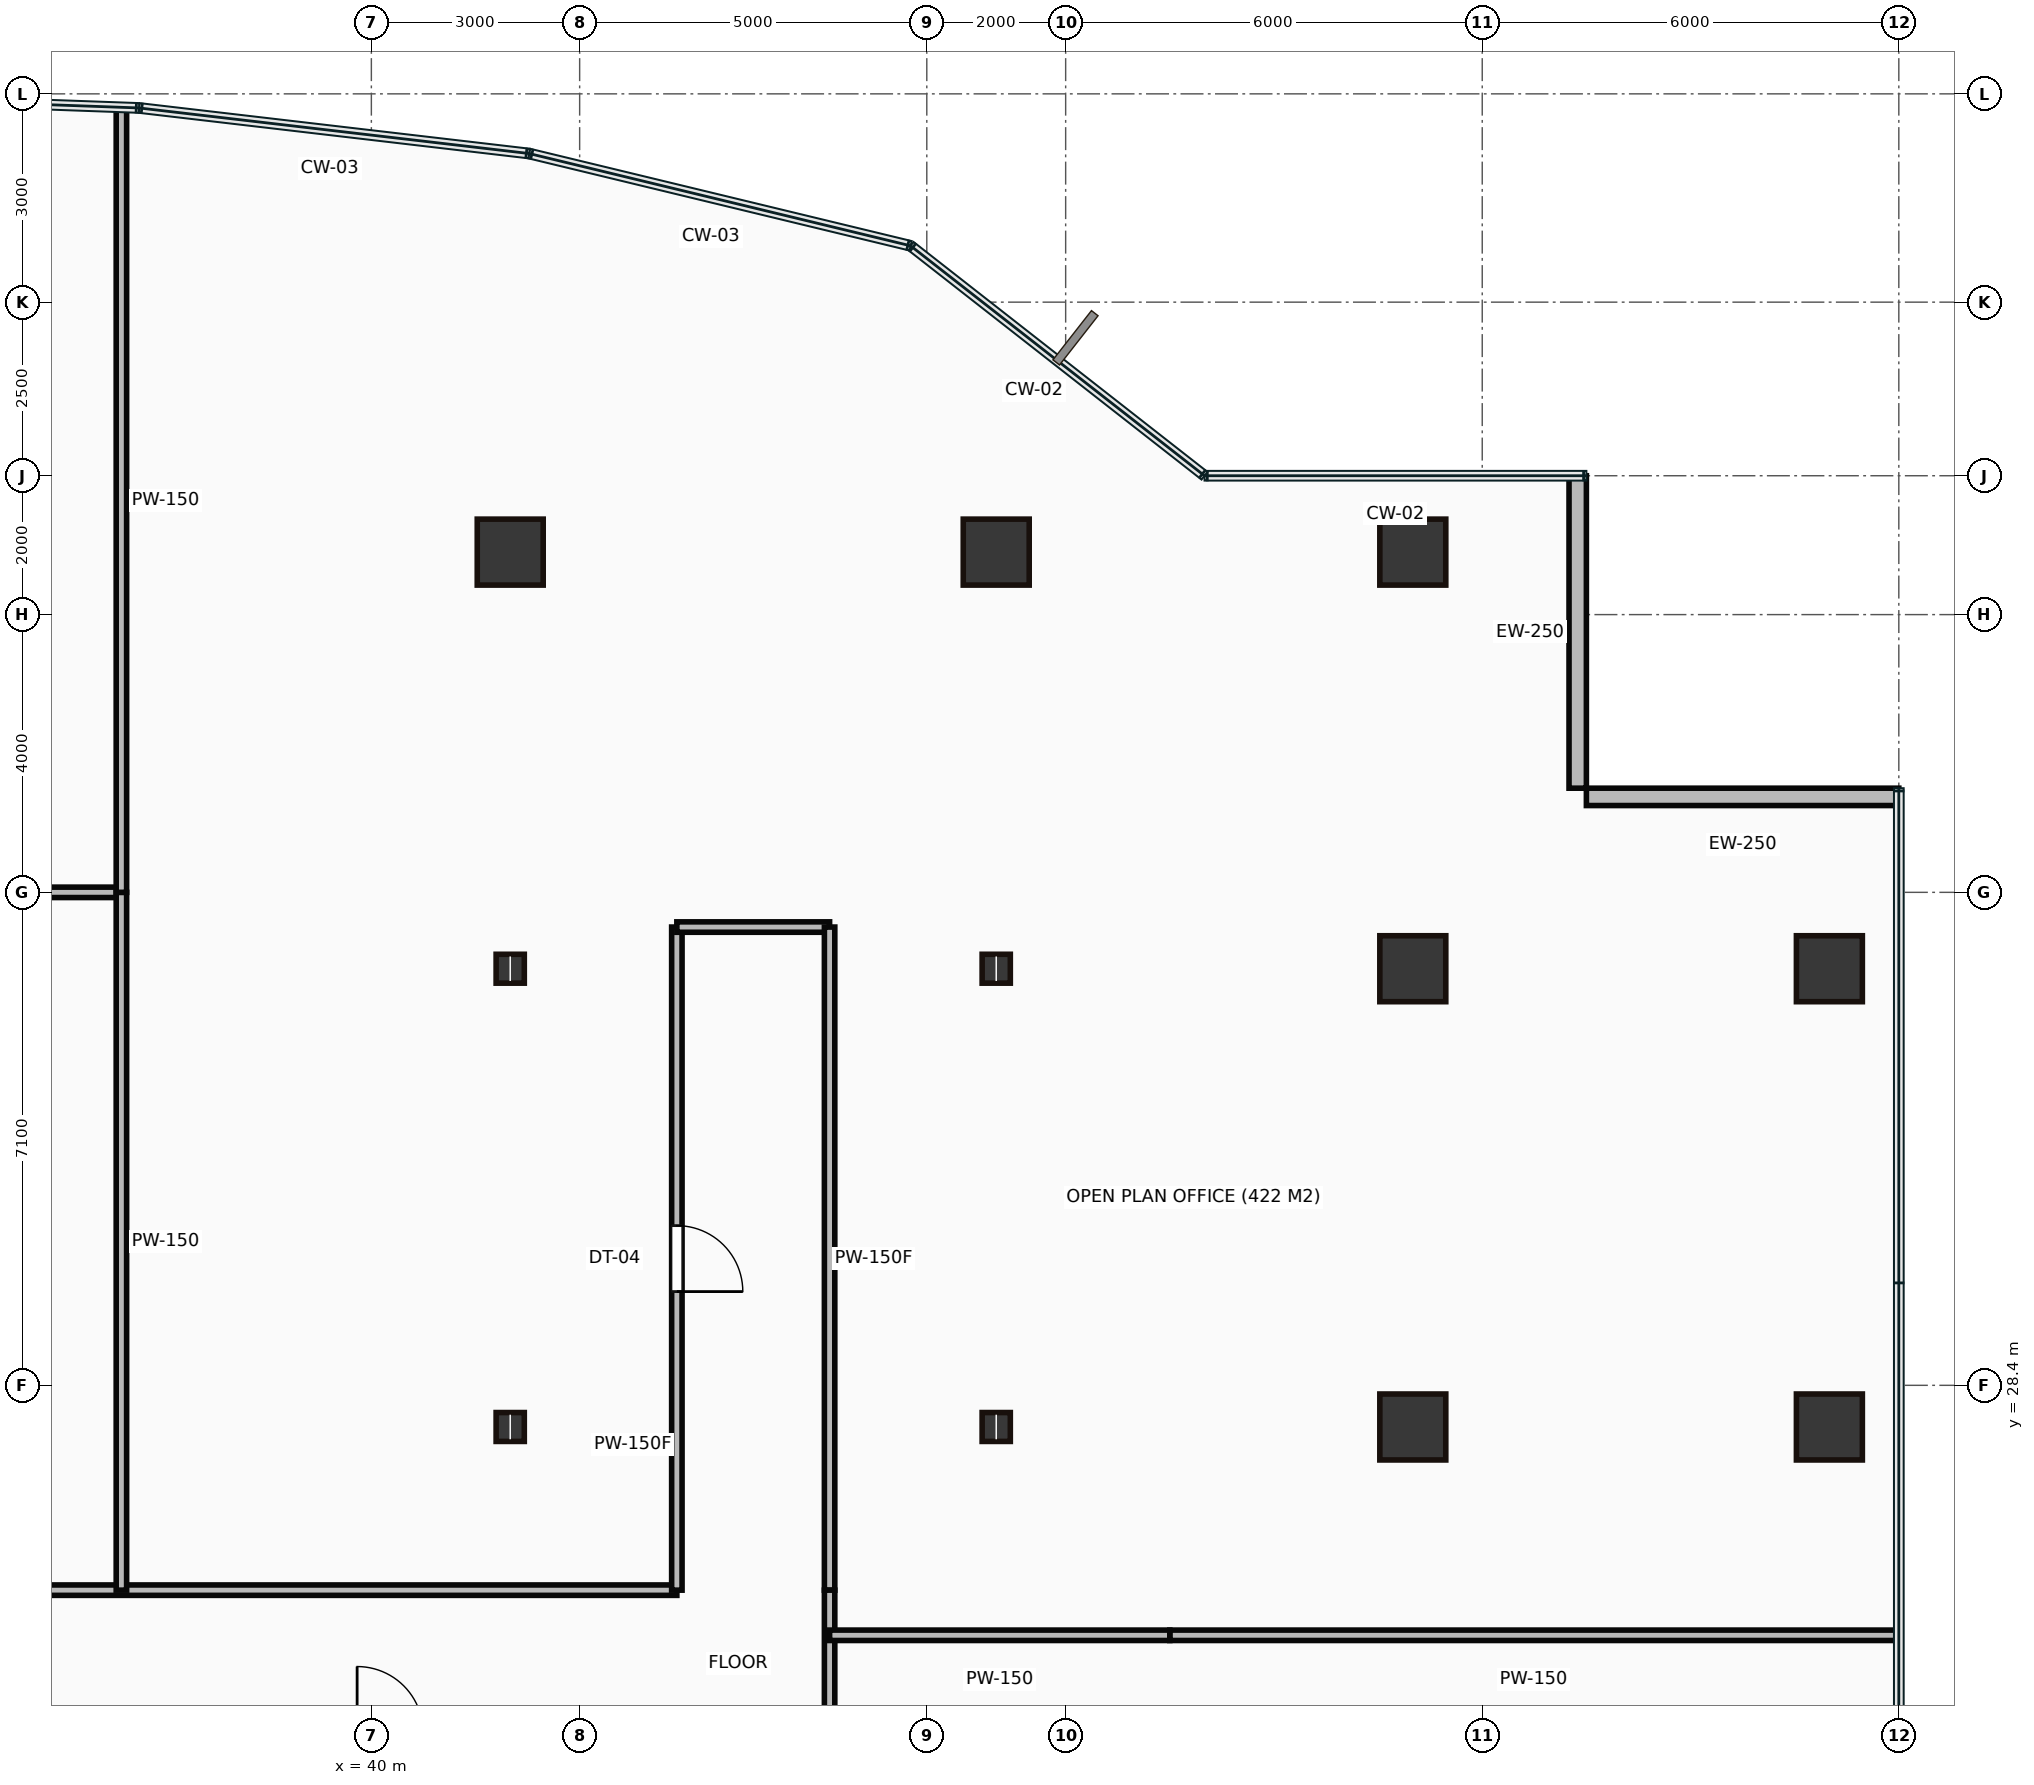
"""IFC4 building model, lengths in metres.
Left out: names, types, materials, properties, quantities, classifications, styles, units other than length and angle.
Written with IfcOpenShell. Run it as: python <this file> out.ifc"""

import sys

from ifc_helpers import new_model, si_unit, direction, frame, frame_2d, origin, origin_2d, place, context, subcontext, project, spatial, rectangle, hollow_rectangle, i_section, extrude, source, transform, mapped, element, fill, save


model = new_model("IFC4")
c1 = context("Model", 3, precision=1e-05, world=origin(), true_north=direction((0.0, 1.0)))
c2 = subcontext(c1, "Body", "Model", "MODEL_VIEW")
j1 = project(units=[si_unit("LENGTHUNIT", "METRE"), si_unit("PLANEANGLEUNIT", "RADIAN")], contexts=[c1])
p1 = place(None, origin())
s1 = spatial("IfcSite", under=j1, at=p1, CompositionType="ELEMENT")
p2 = place(p1, origin())
s2 = spatial("IfcBuilding", under=s1, at=p2, CompositionType="ELEMENT")
p3 = place(p2, frame((0.0, 0.0, 50.75)))
s3 = spatial("IfcBuildingStorey", under=s2, at=p3, CompositionType="ELEMENT", Elevation=50.75)
m1 = source(origin(), c2, "Body", "SweptSolid", [
    extrude(i_section(OverallWidth=0.406, OverallDepth=0.416, WebThickness=0.03, FlangeThickness=0.048, at=origin_2d()), origin(), (0.0, 0.0, 1.0), 3.65),
])
for number, where, z_axis, x_axis in (
    (1, (42.0, 27.8, 0.0), (0.0, 0.0, 1.0), (1.0, 0.0, 0.0)),
    (2, (42.0, 34.4, 0.0), (0.0, 0.0, 1.0), (1.0, 0.0, 0.0)),
):
    element("IfcColumn", number, at=place(p3, frame(where, z_axis=z_axis, x_axis=x_axis)), inside=s3, PredefinedType="COLUMN", context=c2, shape_type="MappedRepresentation", body=[
        mapped(m1, transform((0.0, 0.0, 0.0))),
    ])
m2 = source(origin(), c2, "Body", "SweptSolid", [
    extrude(hollow_rectangle(XDim=0.95, YDim=0.95, WallThickness=0.045, at=origin_2d()), origin(), (0.0, 0.0, 1.0), 3.65),
])
p4 = place(p3, frame((42.0, 40.4, 0.0), z_axis=(0.0, 0.0, 1.0), x_axis=(1.0, 0.0, 0.0)))
e3 = element("IfcColumn", 3, at=p4, inside=s3, PredefinedType="COLUMN", context=c2, shape_type="MappedRepresentation", body=[
    mapped(m2, transform((0.0, 0.0, 0.0))),
])
for number, where, z_axis, x_axis in (
    (4, (49.0, 27.8, 0.0), (0.0, 0.0, 1.0), (1.0, 0.0, 0.0)),
    (5, (49.0, 34.4, 0.0), (0.0, 0.0, 1.0), (1.0, 0.0, 0.0)),
):
    element("IfcColumn", number, at=place(p3, frame(where, z_axis=z_axis, x_axis=x_axis)), inside=s3, PredefinedType="COLUMN", context=c2, shape_type="MappedRepresentation", body=[
        mapped(m1, transform((0.0, 0.0, 0.0))),
    ])
for number, where, z_axis, x_axis in (
    (6, (49.0, 40.4, 0.0), (0.0, 0.0, 1.0), (1.0, 0.0, 0.0)),
    (7, (55.0, 27.8, 0.0), (0.0, 0.0, 1.0), (1.0, 0.0, 0.0)),
    (8, (55.0, 34.4, 0.0), (0.0, 0.0, 1.0), (1.0, 0.0, 0.0)),
    (9, (55.0, 40.4, 0.0), (0.0, 0.0, 1.0), (1.0, 0.0, 0.0)),
    (10, (61.0, 27.8, 0.0), (0.0, 0.0, 1.0), (1.0, 0.0, 0.0)),
    (11, (61.0, 34.4, 0.0), (0.0, 0.0, 1.0), (1.0, 0.0, 0.0)),
):
    element("IfcColumn", number, at=place(p3, frame(where, z_axis=z_axis, x_axis=x_axis)), inside=s3, PredefinedType="COLUMN", context=c2, shape_type="MappedRepresentation", body=[
        mapped(m2, transform((0.0, 0.0, 0.0))),
    ])
m3 = source(origin(), c2, "Body", "SweptSolid", [
    extrude(rectangle(XDim=4.5, YDim=0.25, at=frame_2d((2.25, 0.0))), origin(), (0.0, 0.0, 1.0), 3.4),
])
for number, where, z_axis, x_axis in (
    (12, (62.0, 36.875, 0.0), (0.0, 0.0, 1.0), (-1.0, 0.0, 0.0)),
    (13, (57.375, 37.0, 0.0), (0.0, 0.0, 1.0), (0.0, 1.0, 0.0)),
):
    element("IfcWall", number, at=place(p3, frame(where, z_axis=z_axis, x_axis=x_axis)), inside=s3, PredefinedType="STANDARD", context=c2, shape_type="MappedRepresentation", body=[
        mapped(m3, transform((0.0, 0.0, 0.0))),
    ])
m4 = source(origin(), c2, "Body", "SweptSolid", [
    extrude(rectangle(XDim=38.8, YDim=0.15, at=frame_2d((19.4, 0.0))), origin(), (0.0, 0.0, 1.0), 3.4),
])
p5 = place(p3, frame((5.6, 25.45, 0.0), z_axis=(0.0, 0.0, 1.0), x_axis=(1.0, 0.0, 0.0)))
e14 = element("IfcWall", 14, at=p5, inside=s3, PredefinedType="PARTITIONING", context=c2, shape_type="MappedRepresentation", body=[
    mapped(m4, transform((0.0, 0.0, 0.0))),
])
p6 = place(p5, frame((14.125, 0.0, 0.0)))
e15 = element("IfcOpeningElement", 15, at=p6, cuts=e14, PredefinedType="OPENING", context=c2, shape_type="SweptSolid", body=[
    extrude(rectangle(XDim=0.95, YDim=2.15, at=frame_2d((0.475, 1.075))), frame((0.0, 0.085, 0.0), z_axis=(0.0, -1.0, 0.0), x_axis=(1.0, 0.0, 0.0)), (0.0, 0.0, 1.0), 0.17),
])
p7 = place(p5, frame((24.925, 0.0, 0.0)))
e16 = element("IfcOpeningElement", 16, at=p7, cuts=e14, PredefinedType="OPENING", context=c2, shape_type="SweptSolid", body=[
    extrude(rectangle(XDim=0.95, YDim=2.15, at=frame_2d((0.475, 1.075))), frame((0.0, 0.085, 0.0), z_axis=(0.0, -1.0, 0.0), x_axis=(1.0, 0.0, 0.0)), (0.0, 0.0, 1.0), 0.17),
])
m5 = source(origin(), c2, "Body", "SweptSolid", [
    extrude(rectangle(XDim=9.55, YDim=0.15, at=frame_2d((4.775, 0.0))), origin(), (0.0, 0.0, 1.0), 3.4),
])
p8 = place(p3, frame((44.4, 25.45, 0.0), z_axis=(0.0, 0.0, 1.0), x_axis=(0.0, 1.0, 0.0)))
e17 = element("IfcWall", 17, at=p8, inside=s3, PredefinedType="PARTITIONING", context=c2, shape_type="MappedRepresentation", body=[
    mapped(m5, transform((0.0, 0.0, 0.0))),
])
p9 = place(p8, frame((4.3, 0.0, 0.0)))
e18 = element("IfcOpeningElement", 18, at=p9, cuts=e17, PredefinedType="OPENING", context=c2, shape_type="SweptSolid", body=[
    extrude(rectangle(XDim=0.95, YDim=2.15, at=frame_2d((0.475, 1.075))), frame((0.0, 0.085, 0.0), z_axis=(0.0, -1.0, 0.0), x_axis=(1.0, 0.0, 0.0)), (0.0, 0.0, 1.0), 0.17),
])
m6 = source(origin(), c2, "Body", "SweptSolid", [
    extrude(rectangle(XDim=2.2, YDim=0.15, at=frame_2d((1.1, 0.0))), origin(), (0.0, 0.0, 1.0), 3.4),
])
p10 = place(p3, frame((44.4, 35.0, 0.0), z_axis=(0.0, 0.0, 1.0), x_axis=(1.0, 0.0, 0.0)))
e19 = element("IfcWall", 19, at=p10, inside=s3, PredefinedType="PARTITIONING", context=c2, shape_type="MappedRepresentation", body=[
    mapped(m6, transform((0.0, 0.0, 0.0))),
])
p11 = place(p3, frame((46.6, 35.0, 0.0), z_axis=(0.0, 0.0, 1.0), x_axis=(0.0, -1.0, 0.0)))
e20 = element("IfcWall", 20, at=p11, inside=s3, PredefinedType="PARTITIONING", context=c2, shape_type="MappedRepresentation", body=[
    mapped(m5, transform((0.0, 0.0, 0.0))),
])
m7 = source(origin(), c2, "Body", "SweptSolid", [
    extrude(rectangle(XDim=2.05, YDim=0.15, at=frame_2d((1.025, 0.0))), origin(), (0.0, 0.0, 1.0), 3.4),
])
p12 = place(p3, frame((46.6, 25.45, 0.0), z_axis=(0.0, 0.0, 1.0), x_axis=(0.0, -1.0, 0.0)))
e21 = element("IfcWall", 21, at=p12, inside=s3, PredefinedType="PARTITIONING", context=c2, shape_type="MappedRepresentation", body=[
    mapped(m7, transform((0.0, 0.0, 0.0))),
])
m8 = source(origin(), c2, "Body", "SweptSolid", [
    extrude(rectangle(XDim=10.8, YDim=0.15, at=frame_2d((5.4, 0.0))), origin(), (0.0, 0.0, 1.0), 3.4),
])
p13 = place(p3, frame((36.4, 35.5, 0.0), z_axis=(0.0, 0.0, 1.0), x_axis=(-1.0, 0.0, 0.0)))
e22 = element("IfcWall", 22, at=p13, inside=s3, PredefinedType="PARTITIONING", context=c2, shape_type="MappedRepresentation", body=[
    mapped(m8, transform((0.0, 0.0, 0.0))),
])
m9 = source(origin(), c2, "Body", "SweptSolid", [
    extrude(rectangle(XDim=10.05, YDim=0.15, at=frame_2d((5.025, 0.0))), origin(), (0.0, 0.0, 1.0), 3.4),
])
p14 = place(p3, frame((36.4, 35.5, 0.0), z_axis=(0.0, 0.0, 1.0), x_axis=(0.0, -1.0, 0.0)))
e23 = element("IfcWall", 23, at=p14, inside=s3, PredefinedType="PARTITIONING", context=c2, shape_type="MappedRepresentation", body=[
    mapped(m9, transform((0.0, 0.0, 0.0))),
])
m10 = source(origin(), c2, "Body", "SweptSolid", [
    extrude(rectangle(XDim=11.286, YDim=0.15, at=frame_2d((5.643, 0.0))), origin(), (0.0, 0.0, 1.0), 3.4),
])
p15 = place(p3, frame((36.4, 46.786, 0.0), z_axis=(0.0, 0.0, 1.0), x_axis=(0.0, -1.0, 0.0)))
e24 = element("IfcWall", 24, at=p15, inside=s3, PredefinedType="PARTITIONING", context=c2, shape_type="MappedRepresentation", body=[
    mapped(m10, transform((0.0, 0.0, 0.0))),
])
m11 = source(origin(), c2, "Body", "SweptSolid", [
    extrude(rectangle(XDim=10.48, YDim=0.15, at=frame_2d((5.24, 0.0))), origin(), (0.0, 0.0, 1.0), 3.4),
])
p16 = place(p3, frame((61.98, 24.8, 0.0), z_axis=(0.0, 0.0, 1.0), x_axis=(-1.0, 0.0, 0.0)))
e25 = element("IfcWall", 25, at=p16, inside=s3, PredefinedType="PARTITIONING", context=c2, shape_type="MappedRepresentation", body=[
    mapped(m11, transform((0.0, 0.0, 0.0))),
])
m12 = source(origin(), c2, "Body", "SweptSolid", [
    extrude(rectangle(XDim=4.9, YDim=0.15, at=frame_2d((2.45, 0.0))), origin(), (0.0, 0.0, 1.0), 3.4),
])
p17 = place(p3, frame((51.5, 24.8, 0.0), z_axis=(0.0, 0.0, 1.0), x_axis=(-1.0, 0.0, 0.0)))
e26 = element("IfcWall", 26, at=p17, inside=s3, PredefinedType="PARTITIONING", context=c2, shape_type="MappedRepresentation", body=[
    mapped(m12, transform((0.0, 0.0, 0.0))),
])
m13 = source(origin(), c2, "Body", "SweptSolid", [
    extrude(rectangle(XDim=0.95, YDim=2.15, at=frame_2d((0.475, 1.075))), frame((0.0, 0.025, 0.0), z_axis=(0.0, -1.0, 0.0), x_axis=(1.0, 0.0, 0.0)), (0.0, 0.0, 1.0), 0.05),
])
p18 = place(p9, origin())
e27 = element("IfcDoor", 27, at=p18, inside=s3, OperationType="SINGLE_SWING_LEFT", PredefinedType="DOOR", context=c2, shape_type="MappedRepresentation", body=[
    mapped(m13, transform((0.0, 0.0, 0.0))),
])
fill(e18, e27)
save(model, sys.argv[1])
